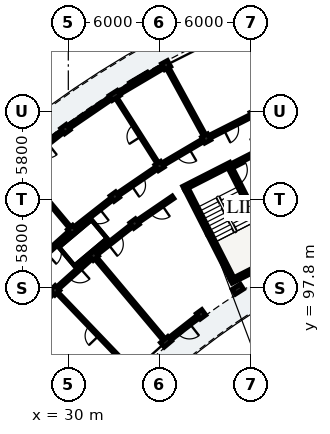
"""IFC4 building model, lengths in metres.
Left out: names, types, materials, properties, quantities, classifications, styles, units other than length and angle.
Written with IfcOpenShell. Run it as: python <this file> out.ifc"""

import sys

from ifc_helpers import new_model, si_unit, direction, frame, frame_2d, origin, origin_2d, place, context, subcontext, project, spatial, rectangle, extrude, element, fill, save


model = new_model("IFC4")
c1 = context("Model", 3, precision=1e-05, world=origin(), true_north=direction((0.0, 1.0)))
c2 = subcontext(c1, "Body", "Model", "MODEL_VIEW")
j1 = project(units=[si_unit("LENGTHUNIT", "METRE"), si_unit("PLANEANGLEUNIT", "RADIAN")], contexts=[c1])
p1 = place(None, origin())
s1 = spatial("IfcSite", under=j1, at=p1, CompositionType="ELEMENT")
p2 = place(p1, origin())
s2 = spatial("IfcBuilding", under=s1, at=p2, CompositionType="ELEMENT")
p3 = place(p2, frame((0.0, 0.0, 42.44)))
s3 = spatial("IfcBuildingStorey", under=s2, at=p3, CompositionType="ELEMENT", Elevation=42.44)
p4 = place(p3, frame((37.773, 104.296, 0.0), z_axis=(0.0, 0.0, 1.0), x_axis=(0.453992276384, -0.891005618941, 0.0)))
e1 = element("IfcWall", 1, at=p4, inside=s3, PredefinedType="SHEAR", context=c2, shape_type="SweptSolid", body=[
    extrude(rectangle(XDim=6.6, YDim=0.28, at=frame_2d((3.3, 0.0))), origin(), (0.0, 0.0, 1.0), 3.11),
])
for number, where, z_axis, x_axis in (
    (2, (40.709, 98.227, 0.0), (0.0, 0.0, 1.0), (0.891, 0.454, 0.0)),
    (3, (37.585, 104.357, 0.0), (0.0, 0.0, 1.0), (0.891, 0.454, 0.0)),
):
    element("IfcWall", number, at=place(p3, frame(where, z_axis=z_axis, x_axis=x_axis)), inside=s3, PredefinedType="SHEAR", context=c2, shape_type="SweptSolid", body=[
        extrude(rectangle(XDim=3.48, YDim=0.28, at=frame_2d((1.74, 0.0))), origin(), (0.0, 0.0, 1.0), 3.11),
    ])
p5 = place(p3, frame((40.625, 105.748, 0.0), z_axis=(0.0, 0.0, 1.0), x_axis=(0.453992276384, -0.891005618941, 0.0)))
e4 = element("IfcWall", 4, at=p5, inside=s3, PredefinedType="SHEAR", context=c2, shape_type="SweptSolid", body=[
    extrude(rectangle(XDim=6.6, YDim=0.28, at=frame_2d((3.3, 0.0))), origin(), (0.0, 0.0, 1.0), 3.11),
])
p6 = place(p5, frame((0.22, 0.0, 0.0)))
e5 = element("IfcOpeningElement", 5, at=p6, cuts=e4, PredefinedType="OPENING", context=c2, shape_type="SweptSolid", body=[
    extrude(rectangle(XDim=1.05, YDim=2.15, at=frame_2d((0.525, 1.075))), frame((0.0, 0.15, 0.0), z_axis=(0.0, -1.0, 0.0), x_axis=(1.0, 0.0, 0.0)), (0.0, 0.0, 1.0), 0.3),
])
for number, where, z_axis, x_axis in (
    (6, (42.252, 109.23, 0.0), (0.0, 0.0, 1.0), (-0.421, 0.907, 0.0)),
    (7, (39.072, 107.625, 0.0), (0.0, 0.0, 1.0), (-0.48, 0.877, 0.0)),
    (8, (36.433, 112.451, 0.0), (0.0, 0.0, 1.0), (-0.48, 0.877, 0.0)),
):
    element("IfcColumn", number, at=place(p3, frame(where, z_axis=z_axis, x_axis=x_axis)), inside=s3, PredefinedType="COLUMN", context=c2, shape_type="SweptSolid", body=[
        extrude(rectangle(XDim=0.45, YDim=0.45, at=origin_2d()), origin(), (0.0, 0.0, 1.0), 3.12),
    ])
p7 = place(p3, frame((41.153, 97.712, 0.0), z_axis=(0.0, 0.0, 1.0), x_axis=(-0.536481603385, 0.843912015099, 0.0)))
e9 = element("IfcColumn", 9, at=p7, inside=s3, PredefinedType="PILASTER", context=c2, shape_type="SweptSolid", body=[
    extrude(rectangle(XDim=0.39, YDim=0.63, at=origin_2d()), origin(), (0.0, 0.0, 1.0), 3.12),
])
p8 = place(p3, frame((36.003, 105.813, 0.0), z_axis=(0.0, 0.0, 1.0), x_axis=(-0.536481603385, 0.843912015099, 0.0)))
e10 = element("IfcColumn", 10, at=p8, inside=s3, PredefinedType="COLUMN", context=c2, shape_type="SweptSolid", body=[
    extrude(rectangle(XDim=0.45, YDim=0.45, at=origin_2d()), origin(), (0.0, 0.0, 1.0), 3.12),
])
p9 = place(p3, frame((33.052, 110.455, 0.0), z_axis=(0.0, 0.0, 1.0), x_axis=(-0.536481603385, 0.843912015099, 0.0)))
e11 = element("IfcColumn", 11, at=p9, inside=s3, PredefinedType="PILASTER", context=c2, shape_type="SweptSolid", body=[
    extrude(rectangle(XDim=0.39, YDim=0.63, at=origin_2d()), origin(), (0.0, 0.0, 1.0), 3.12),
])
for number, where, z_axis, x_axis in (
    (12, (38.734, 96.059, 0.0), (0.0, 0.0, 1.0), (-0.591, 0.807, 0.0)),
    (13, (34.361, 102.029, 0.0), (0.0, 0.0, 1.0), (-0.591, 0.807, 0.0)),
    (14, (33.061, 103.804, 0.0), (0.0, 0.0, 1.0), (-0.591, 0.807, 0.0)),
    (15, (29.811, 108.241, 0.0), (0.0, 0.0, 1.0), (-0.591, 0.807, 0.0)),
):
    element("IfcColumn", number, at=place(p3, frame(where, z_axis=z_axis, x_axis=x_axis)), inside=s3, PredefinedType="COLUMN", context=c2, shape_type="SweptSolid", body=[
        extrude(rectangle(XDim=0.45, YDim=0.45, at=origin_2d()), origin(), (0.0, 0.0, 1.0), 3.12),
    ])
p10 = place(p3, frame((36.428, 94.251, 0.0), z_axis=(0.0, 0.0, 1.0), x_axis=(-0.642787636427, 0.766044420681, 0.0)))
e16 = element("IfcColumn", 16, at=p10, inside=s3, PredefinedType="PILASTER", context=c2, shape_type="SweptSolid", body=[
    extrude(rectangle(XDim=0.39, YDim=0.63, at=origin_2d()), origin(), (0.0, 0.0, 1.0), 3.12),
])
for number, where, z_axis, x_axis in (
    (17, (31.671, 99.919, 0.0), (0.0, 0.0, 1.0), (-0.643, 0.766, 0.0)),
    (18, (30.257, 101.605, 0.0), (0.0, 0.0, 1.0), (-0.643, 0.766, 0.0)),
    (19, (29.127, 97.637, 0.0), (0.0, 0.0, 1.0), (-0.692, 0.722, 0.0)),
):
    element("IfcColumn", number, at=place(p3, frame(where, z_axis=z_axis, x_axis=x_axis)), inside=s3, PredefinedType="COLUMN", context=c2, shape_type="SweptSolid", body=[
        extrude(rectangle(XDim=0.45, YDim=0.45, at=origin_2d()), origin(), (0.0, 0.0, 1.0), 3.12),
    ])
p11 = place(p3, frame((36.265, 112.352, 0.0), z_axis=(0.0, 0.0, 1.0), x_axis=(-0.861132283606, -0.508380949811, 0.0)))
e20 = element("IfcWall", 20, at=p11, inside=s3, PredefinedType="SOLIDWALL", context=c2, shape_type="SweptSolid", body=[
    extrude(rectangle(XDim=3.566, YDim=0.225, at=frame_2d((1.783, 0.0))), origin(), (0.0, 0.0, 1.0), 2.355),
])
p12 = place(p11, frame((1.003, 0.0, 0.55)))
e21 = element("IfcOpeningElement", 21, at=p12, cuts=e20, PredefinedType="OPENING", context=c2, shape_type="SweptSolid", body=[
    extrude(rectangle(XDim=1.56, YDim=1.51, at=frame_2d((0.78, 0.755))), frame((0.0, 0.123, 0.0), z_axis=(0.0, -1.0, 0.0), x_axis=(1.0, 0.0, 0.0)), (0.0, 0.0, 1.0), 0.245),
])
p13 = place(p3, frame((32.916, 110.362, 0.0), z_axis=(0.0, 0.0, 1.0), x_axis=(-0.825772203118, -0.564003784169, 0.0)))
e22 = element("IfcWall", 22, at=p13, inside=s3, PredefinedType="SOLIDWALL", context=c2, shape_type="SweptSolid", body=[
    extrude(rectangle(XDim=3.566, YDim=0.225, at=frame_2d((1.783, 0.0))), origin(), (0.0, 0.0, 1.0), 2.355),
])
p14 = place(p13, frame((0.943, 0.0, 0.55)))
e23 = element("IfcOpeningElement", 23, at=p14, cuts=e22, PredefinedType="OPENING", context=c2, shape_type="SweptSolid", body=[
    extrude(rectangle(XDim=1.68, YDim=1.585, at=frame_2d((0.84, 0.792))), frame((0.0, 0.123, 0.0), z_axis=(0.0, -1.0, 0.0), x_axis=(1.0, 0.0, 0.0)), (0.0, 0.0, 1.0), 0.245),
])
p15 = place(p3, frame((29.657, 108.121, 0.0), z_axis=(0.0, 0.0, 1.0), x_axis=(-0.786798003455, -0.617210581374, 0.0)))
e24 = element("IfcWall", 24, at=p15, inside=s3, PredefinedType="SOLIDWALL", context=c2, shape_type="SweptSolid", body=[
    extrude(rectangle(XDim=3.566, YDim=0.225, at=frame_2d((1.783, 0.0))), origin(), (0.0, 0.0, 1.0), 2.355),
])
p16 = place(p15, frame((1.293, 0.0, 0.0)))
e25 = element("IfcOpeningElement", 25, at=p16, cuts=e24, PredefinedType="OPENING", context=c2, shape_type="SweptSolid", body=[
    extrude(rectangle(XDim=0.98, YDim=2.12, at=frame_2d((0.49, 1.06))), frame((0.0, 0.123, 0.0), z_axis=(0.0, -1.0, 0.0), x_axis=(1.0, 0.0, 0.0)), (0.0, 0.0, 1.0), 0.245),
])
p17 = place(p3, frame((38.58, 95.939, 0.0), z_axis=(0.0, 0.0, 1.0), x_axis=(-0.786819050397, -0.617183750541, 0.0)))
e26 = element("IfcWall", 26, at=p17, inside=s3, PredefinedType="SOLIDWALL", context=c2, shape_type="SweptSolid", body=[
    extrude(rectangle(XDim=2.57, YDim=0.225, at=frame_2d((1.285, 0.0))), origin(), (0.0, 0.0, 1.0), 2.355),
])
p18 = place(p17, frame((0.775, 0.0, 0.0)))
e27 = element("IfcOpeningElement", 27, at=p18, cuts=e26, PredefinedType="OPENING", context=c2, shape_type="SweptSolid", body=[
    extrude(rectangle(XDim=1.02, YDim=2.14, at=frame_2d((0.51, 1.07))), frame((0.0, 0.123, 0.0), z_axis=(0.0, -1.0, 0.0), x_axis=(1.0, 0.0, 0.0)), (0.0, 0.0, 1.0), 0.245),
])
p19 = place(p3, frame((40.682, 105.834, 0.0), z_axis=(0.0, 0.0, 1.0), x_axis=(0.891003372311, 0.453996685595, 0.0)))
e28 = element("IfcWall", 28, at=p19, inside=s3, PredefinedType="PARTITIONING", context=c2, shape_type="SweptSolid", body=[
    extrude(rectangle(XDim=4.9, YDim=0.22, at=frame_2d((2.45, 0.0))), origin(), (0.0, 0.0, 1.0), 2.34),
])
p20 = place(p19, frame((1.95, 0.0, 0.0)))
e29 = element("IfcOpeningElement", 29, at=p20, cuts=e28, PredefinedType="OPENING", context=c2, shape_type="SweptSolid", body=[
    extrude(rectangle(XDim=1.0, YDim=2.15, at=frame_2d((0.5, 1.075))), frame((0.0, 0.12, 0.0), z_axis=(0.0, -1.0, 0.0), x_axis=(1.0, 0.0, 0.0)), (0.0, 0.0, 1.0), 0.24),
])
p21 = place(p3, frame((41.94, 109.073, 0.0), z_axis=(0.0, 0.0, 1.0), x_axis=(-0.89273239336, -0.450587254419, 0.0)))
e30 = element("IfcWall", 30, at=p21, inside=s3, PredefinedType="PARTITIONING", context=c2, shape_type="SweptSolid", body=[
    extrude(rectangle(XDim=2.863, YDim=0.205, at=frame_2d((1.432, 0.0))), origin(), (0.0, 0.0, 1.0), 2.37),
])
p22 = place(p21, frame((0.947, 0.0, 0.0)))
e31 = element("IfcOpeningElement", 31, at=p22, cuts=e30, PredefinedType="OPENING", context=c2, shape_type="SweptSolid", body=[
    extrude(rectangle(XDim=0.97, YDim=2.15, at=frame_2d((0.485, 1.075))), frame((0.0, 0.113, 0.0), z_axis=(0.0, -1.0, 0.0), x_axis=(1.0, 0.0, 0.0)), (0.0, 0.0, 1.0), 0.225),
])
p23 = place(p3, frame((38.88, 107.976, 0.0), z_axis=(0.0, 0.0, 1.0), x_axis=(-0.479721743761, 0.877420679357, 0.0)))
e32 = element("IfcWall", 32, at=p23, inside=s3, PredefinedType="PARTITIONING", context=c2, shape_type="SweptSolid", body=[
    extrude(rectangle(XDim=4.7, YDim=0.185, at=frame_2d((2.35, 0.0))), origin(), (0.0, 0.0, 1.0), 2.37),
])
p24 = place(p3, frame((38.77, 107.447, 0.0), z_axis=(0.0, 0.0, 1.0), x_axis=(-0.861113214678, -0.508413248753, 0.0)))
e33 = element("IfcWall", 33, at=p24, inside=s3, PredefinedType="PARTITIONING", context=c2, shape_type="SweptSolid", body=[
    extrude(rectangle(XDim=2.863, YDim=0.205, at=frame_2d((1.432, 0.0))), origin(), (0.0, 0.0, 1.0), 2.37),
])
p25 = place(p24, frame((0.957, 0.0, 0.0)))
e34 = element("IfcOpeningElement", 34, at=p25, cuts=e33, PredefinedType="OPENING", context=c2, shape_type="SweptSolid", body=[
    extrude(rectangle(XDim=0.95, YDim=2.13, at=frame_2d((0.475, 1.065))), frame((0.0, 0.113, 0.0), z_axis=(0.0, -1.0, 0.0), x_axis=(1.0, 0.0, 0.0)), (0.0, 0.0, 1.0), 0.225),
])
p26 = place(p3, frame((35.789, 106.151, 0.0), z_axis=(0.0, 0.0, 1.0), x_axis=(-0.536492262982, 0.843905238614, 0.0)))
e35 = element("IfcWall", 35, at=p26, inside=s3, PredefinedType="PARTITIONING", context=c2, shape_type="SweptSolid", body=[
    extrude(rectangle(XDim=4.7, YDim=0.125, at=frame_2d((2.35, 0.0))), origin(), (0.0, 0.0, 1.0), 2.37),
])
p27 = place(p26, frame((1.895, 0.0, 0.0)))
e36 = element("IfcOpeningElement", 36, at=p27, cuts=e35, PredefinedType="OPENING", context=c2, shape_type="SweptSolid", body=[
    extrude(rectangle(XDim=0.91, YDim=2.1, at=frame_2d((0.455, 1.05))), frame((0.0, 0.073, 0.0), z_axis=(0.0, -1.0, 0.0), x_axis=(1.0, 0.0, 0.0)), (0.0, 0.0, 1.0), 0.145),
])
p28 = place(p3, frame((35.714, 105.616, 0.0), z_axis=(0.0, 0.0, 1.0), x_axis=(-0.825779671787, -0.563992848947, 0.0)))
e37 = element("IfcWall", 37, at=p28, inside=s3, PredefinedType="PARTITIONING", context=c2, shape_type="SweptSolid", body=[
    extrude(rectangle(XDim=2.863, YDim=0.205, at=frame_2d((1.432, 0.0))), origin(), (0.0, 0.0, 1.0), 2.37),
])
p29 = place(p28, frame((0.967, 0.0, 0.0)))
e38 = element("IfcOpeningElement", 38, at=p29, cuts=e37, PredefinedType="OPENING", context=c2, shape_type="SweptSolid", body=[
    extrude(rectangle(XDim=0.93, YDim=2.12, at=frame_2d((0.465, 1.06))), frame((0.0, 0.113, 0.0), z_axis=(0.0, -1.0, 0.0), x_axis=(1.0, 0.0, 0.0)), (0.0, 0.0, 1.0), 0.225),
])
p30 = place(p3, frame((36.895, 103.76, 0.0), z_axis=(0.0, 0.0, 1.0), x_axis=(-0.825752009056, -0.56403334967, 0.0)))
e39 = element("IfcWall", 39, at=p30, inside=s3, PredefinedType="PARTITIONING", context=c2, shape_type="SweptSolid", body=[
    extrude(rectangle(XDim=2.718, YDim=0.205, at=frame_2d((1.359, 0.0))), origin(), (0.0, 0.0, 1.0), 2.37),
])
p31 = place(p30, frame((0.894, 0.0, 0.0)))
e40 = element("IfcOpeningElement", 40, at=p31, cuts=e39, PredefinedType="OPENING", context=c2, shape_type="SweptSolid", body=[
    extrude(rectangle(XDim=0.93, YDim=2.12, at=frame_2d((0.465, 1.06))), frame((0.0, 0.113, 0.0), z_axis=(0.0, -1.0, 0.0), x_axis=(1.0, 0.0, 0.0)), (0.0, 0.0, 1.0), 0.225),
])
p32 = place(p3, frame((32.785, 103.588, 0.0), z_axis=(0.0, 0.0, 1.0), x_axis=(-0.786806323554, -0.617199975061, 0.0)))
e41 = element("IfcWall", 41, at=p32, inside=s3, PredefinedType="PARTITIONING", context=c2, shape_type="SweptSolid", body=[
    extrude(rectangle(XDim=2.863, YDim=0.205, at=frame_2d((1.432, 0.0))), origin(), (0.0, 0.0, 1.0), 2.37),
])
p33 = place(p32, frame((0.937, 0.0, 0.0)))
e42 = element("IfcOpeningElement", 42, at=p33, cuts=e41, PredefinedType="OPENING", context=c2, shape_type="SweptSolid", body=[
    extrude(rectangle(XDim=0.99, YDim=2.16, at=frame_2d((0.495, 1.08))), frame((0.0, 0.113, 0.0), z_axis=(0.0, -1.0, 0.0), x_axis=(1.0, 0.0, 0.0)), (0.0, 0.0, 1.0), 0.225),
])
p34 = place(p3, frame((34.085, 101.813, 0.0), z_axis=(0.0, 0.0, 1.0), x_axis=(-0.786835457019, -0.617162833924, 0.0)))
e43 = element("IfcWall", 43, at=p34, inside=s3, PredefinedType="PARTITIONING", context=c2, shape_type="SweptSolid", body=[
    extrude(rectangle(XDim=2.718, YDim=0.205, at=frame_2d((1.359, 0.0))), origin(), (0.0, 0.0, 1.0), 2.37),
])
p35 = place(p34, frame((0.864, 0.0, 0.0)))
e44 = element("IfcOpeningElement", 44, at=p35, cuts=e43, PredefinedType="OPENING", context=c2, shape_type="SweptSolid", body=[
    extrude(rectangle(XDim=0.99, YDim=2.16, at=frame_2d((0.495, 1.08))), frame((0.0, 0.113, 0.0), z_axis=(0.0, -1.0, 0.0), x_axis=(1.0, 0.0, 0.0)), (0.0, 0.0, 1.0), 0.225),
])
p36 = place(p3, frame((30.0, 101.911, 0.0), z_axis=(0.0, 0.0, 1.0), x_axis=(-0.642811926223, 0.766024038465, 0.0)))
e45 = element("IfcWall", 45, at=p36, inside=s3, PredefinedType="PLUMBINGWALL", context=c2, shape_type="SweptSolid", body=[
    extrude(rectangle(XDim=4.7, YDim=0.14, at=frame_2d((2.35, 0.0))), origin(), (0.0, 0.0, 1.0), 2.37),
])
p37 = place(p36, frame((1.92, 0.0, 0.0)))
e46 = element("IfcOpeningElement", 46, at=p37, cuts=e45, PredefinedType="OPENING", context=c2, shape_type="SweptSolid", body=[
    extrude(rectangle(XDim=0.86, YDim=2.06, at=frame_2d((0.43, 1.03))), frame((0.0, 0.08, 0.0), z_axis=(0.0, -1.0, 0.0), x_axis=(1.0, 0.0, 0.0)), (0.0, 0.0, 1.0), 0.16),
])
p38 = place(p3, frame((36.171, 94.557, 0.0), z_axis=(0.0, 0.0, 1.0), x_axis=(-0.642789470807, 0.766042881449, 0.0)))
e47 = element("IfcWall", 47, at=p38, inside=s3, PredefinedType="PARTITIONING", context=c2, shape_type="SweptSolid", body=[
    extrude(rectangle(XDim=6.6, YDim=0.185, at=frame_2d((3.3, 0.0))), origin(), (0.0, 0.0, 1.0), 2.37),
])
p39 = place(p3, frame((29.997, 101.371, 0.0), z_axis=(0.0, 0.0, 1.0), x_axis=(-0.744433521088, -0.667696587291, 0.0)))
e48 = element("IfcWall", 48, at=p39, inside=s3, PredefinedType="PARTITIONING", context=c2, shape_type="SweptSolid", body=[
    extrude(rectangle(XDim=2.863, YDim=0.205, at=frame_2d((1.432, 0.0))), origin(), (0.0, 0.0, 1.0), 2.37),
])
p40 = place(p39, frame((0.947, 0.0, 0.0)))
e49 = element("IfcOpeningElement", 49, at=p40, cuts=e48, PredefinedType="OPENING", context=c2, shape_type="SweptSolid", body=[
    extrude(rectangle(XDim=0.97, YDim=2.15, at=frame_2d((0.485, 1.075))), frame((0.0, 0.113, 0.0), z_axis=(0.0, -1.0, 0.0), x_axis=(1.0, 0.0, 0.0)), (0.0, 0.0, 1.0), 0.225),
])
p41 = place(p3, frame((31.411, 99.686, 0.0), z_axis=(0.0, 0.0, 1.0), x_axis=(-0.744418559135, -0.667713268413, 0.0)))
e50 = element("IfcWall", 50, at=p41, inside=s3, PredefinedType="PARTITIONING", context=c2, shape_type="SweptSolid", body=[
    extrude(rectangle(XDim=2.718, YDim=0.205, at=frame_2d((1.359, 0.0))), origin(), (0.0, 0.0, 1.0), 2.37),
])
p42 = place(p41, frame((0.874, 0.0, 0.0)))
e51 = element("IfcOpeningElement", 51, at=p42, cuts=e50, PredefinedType="OPENING", context=c2, shape_type="SweptSolid", body=[
    extrude(rectangle(XDim=0.97, YDim=2.15, at=frame_2d((0.485, 1.075))), frame((0.0, 0.113, 0.0), z_axis=(0.0, -1.0, 0.0), x_axis=(1.0, 0.0, 0.0)), (0.0, 0.0, 1.0), 0.225),
])
p43 = place(p3, frame((33.97, 92.583, 0.0), z_axis=(0.0, 0.0, 1.0), x_axis=(-0.691872422458, 0.722019771919, 0.0)))
e52 = element("IfcWall", 52, at=p43, inside=s3, PredefinedType="PARTITIONING", context=c2, shape_type="SweptSolid", body=[
    extrude(rectangle(XDim=6.6, YDim=0.125, at=frame_2d((3.3, 0.0))), origin(), (0.0, 0.0, 1.0), 2.37),
])
p44 = place(p43, frame((2.855, 0.0, 0.0)))
e53 = element("IfcOpeningElement", 53, at=p44, cuts=e52, PredefinedType="OPENING", context=c2, shape_type="SweptSolid", body=[
    extrude(rectangle(XDim=0.89, YDim=2.1, at=frame_2d((0.445, 1.05))), frame((0.0, 0.073, 0.0), z_axis=(0.0, -1.0, 0.0), x_axis=(1.0, 0.0, 0.0)), (0.0, 0.0, 1.0), 0.145),
])
p45 = place(p12, origin())
e54 = element("IfcWindow", 54, at=p45, inside=s3, PartitioningType="SINGLE_PANEL", PredefinedType="WINDOW", context=c2, shape_type="SweptSolid", body=[
    extrude(rectangle(XDim=1.56, YDim=1.51, at=frame_2d((0.78, 0.755))), frame((0.0, 0.03, 0.0), z_axis=(0.0, -1.0, 0.0), x_axis=(1.0, 0.0, 0.0)), (0.0, 0.0, 1.0), 0.06),
])
fill(e21, e54)
p46 = place(p14, origin())
e55 = element("IfcWindow", 55, at=p46, inside=s3, PartitioningType="SINGLE_PANEL", PredefinedType="WINDOW", context=c2, shape_type="SweptSolid", body=[
    extrude(rectangle(XDim=1.68, YDim=1.585, at=frame_2d((0.84, 0.792))), frame((0.0, 0.03, 0.0), z_axis=(0.0, -1.0, 0.0), x_axis=(1.0, 0.0, 0.0)), (0.0, 0.0, 1.0), 0.06),
])
fill(e23, e55)
p47 = place(p18, origin())
e56 = element("IfcDoor", 56, at=p47, inside=s3, OperationType="SINGLE_SWING_LEFT", PredefinedType="DOOR", context=c2, shape_type="SweptSolid", body=[
    extrude(rectangle(XDim=1.02, YDim=2.14, at=frame_2d((0.51, 1.07))), frame((0.0, 0.025, 0.0), z_axis=(0.0, -1.0, 0.0), x_axis=(1.0, 0.0, 0.0)), (0.0, 0.0, 1.0), 0.05),
])
fill(e27, e56)
p48 = place(p6, origin())
e57 = element("IfcDoor", 57, at=p48, inside=s3, OperationType="SINGLE_SWING_LEFT", PredefinedType="DOOR", context=c2, shape_type="SweptSolid", body=[
    extrude(rectangle(XDim=1.05, YDim=2.15, at=frame_2d((0.525, 1.075))), frame((0.0, 0.025, 0.0), z_axis=(0.0, -1.0, 0.0), x_axis=(1.0, 0.0, 0.0)), (0.0, 0.0, 1.0), 0.05),
])
fill(e5, e57)
p49 = place(p22, origin())
e58 = element("IfcDoor", 58, at=p49, inside=s3, OperationType="SINGLE_SWING_RIGHT", PredefinedType="DOOR", context=c2, shape_type="SweptSolid", body=[
    extrude(rectangle(XDim=0.97, YDim=2.15, at=frame_2d((0.485, 1.075))), frame((0.0, 0.025, 0.0), z_axis=(0.0, -1.0, 0.0), x_axis=(1.0, 0.0, 0.0)), (0.0, 0.0, 1.0), 0.05),
])
fill(e31, e58)
p50 = place(p25, origin())
e59 = element("IfcDoor", 59, at=p50, inside=s3, OperationType="SINGLE_SWING_LEFT", PredefinedType="DOOR", context=c2, shape_type="SweptSolid", body=[
    extrude(rectangle(XDim=0.95, YDim=2.13, at=frame_2d((0.475, 1.065))), frame((0.0, 0.025, 0.0), z_axis=(0.0, -1.0, 0.0), x_axis=(1.0, 0.0, 0.0)), (0.0, 0.0, 1.0), 0.05),
])
fill(e34, e59)
p51 = place(p27, origin())
e60 = element("IfcDoor", 60, at=p51, inside=s3, OperationType="SINGLE_SWING_LEFT", PredefinedType="DOOR", context=c2, shape_type="SweptSolid", body=[
    extrude(rectangle(XDim=0.91, YDim=2.1, at=frame_2d((0.455, 1.05))), frame((0.0, 0.025, 0.0), z_axis=(0.0, -1.0, 0.0), x_axis=(1.0, 0.0, 0.0)), (0.0, 0.0, 1.0), 0.05),
])
fill(e36, e60)
p52 = place(p29, origin())
e61 = element("IfcDoor", 61, at=p52, inside=s3, OperationType="SINGLE_SWING_RIGHT", PredefinedType="DOOR", context=c2, shape_type="SweptSolid", body=[
    extrude(rectangle(XDim=0.93, YDim=2.12, at=frame_2d((0.465, 1.06))), frame((0.0, 0.025, 0.0), z_axis=(0.0, -1.0, 0.0), x_axis=(1.0, 0.0, 0.0)), (0.0, 0.0, 1.0), 0.05),
])
fill(e38, e61)
p53 = place(p31, origin())
e62 = element("IfcDoor", 62, at=p53, inside=s3, OperationType="SINGLE_SWING_LEFT", PredefinedType="DOOR", context=c2, shape_type="SweptSolid", body=[
    extrude(rectangle(XDim=0.93, YDim=2.12, at=frame_2d((0.465, 1.06))), frame((0.0, 0.025, 0.0), z_axis=(0.0, -1.0, 0.0), x_axis=(1.0, 0.0, 0.0)), (0.0, 0.0, 1.0), 0.05),
])
fill(e40, e62)
p54 = place(p33, origin())
e63 = element("IfcDoor", 63, at=p54, inside=s3, OperationType="SINGLE_SWING_LEFT", PredefinedType="DOOR", context=c2, shape_type="SweptSolid", body=[
    extrude(rectangle(XDim=0.99, YDim=2.16, at=frame_2d((0.495, 1.08))), frame((0.0, 0.025, 0.0), z_axis=(0.0, -1.0, 0.0), x_axis=(1.0, 0.0, 0.0)), (0.0, 0.0, 1.0), 0.05),
])
fill(e42, e63)
p55 = place(p35, origin())
e64 = element("IfcDoor", 64, at=p55, inside=s3, OperationType="SINGLE_SWING_RIGHT", PredefinedType="DOOR", context=c2, shape_type="SweptSolid", body=[
    extrude(rectangle(XDim=0.99, YDim=2.16, at=frame_2d((0.495, 1.08))), frame((0.0, 0.025, 0.0), z_axis=(0.0, -1.0, 0.0), x_axis=(1.0, 0.0, 0.0)), (0.0, 0.0, 1.0), 0.05),
])
fill(e44, e64)
p56 = place(p40, origin())
e65 = element("IfcDoor", 65, at=p56, inside=s3, OperationType="SINGLE_SWING_RIGHT", PredefinedType="DOOR", context=c2, shape_type="SweptSolid", body=[
    extrude(rectangle(XDim=0.97, YDim=2.15, at=frame_2d((0.485, 1.075))), frame((0.0, 0.025, 0.0), z_axis=(0.0, -1.0, 0.0), x_axis=(1.0, 0.0, 0.0)), (0.0, 0.0, 1.0), 0.05),
])
fill(e49, e65)
p57 = place(p42, origin())
e66 = element("IfcDoor", 66, at=p57, inside=s3, OperationType="SINGLE_SWING_LEFT", PredefinedType="DOOR", context=c2, shape_type="SweptSolid", body=[
    extrude(rectangle(XDim=0.97, YDim=2.15, at=frame_2d((0.485, 1.075))), frame((0.0, 0.025, 0.0), z_axis=(0.0, -1.0, 0.0), x_axis=(1.0, 0.0, 0.0)), (0.0, 0.0, 1.0), 0.05),
])
fill(e51, e66)
p58 = place(p44, origin())
e67 = element("IfcDoor", 67, at=p58, inside=s3, OperationType="SINGLE_SWING_LEFT", PredefinedType="DOOR", context=c2, shape_type="SweptSolid", body=[
    extrude(rectangle(XDim=0.89, YDim=2.1, at=frame_2d((0.445, 1.05))), frame((0.0, 0.025, 0.0), z_axis=(0.0, -1.0, 0.0), x_axis=(1.0, 0.0, 0.0)), (0.0, 0.0, 1.0), 0.05),
])
fill(e53, e67)
save(model, sys.argv[1])
